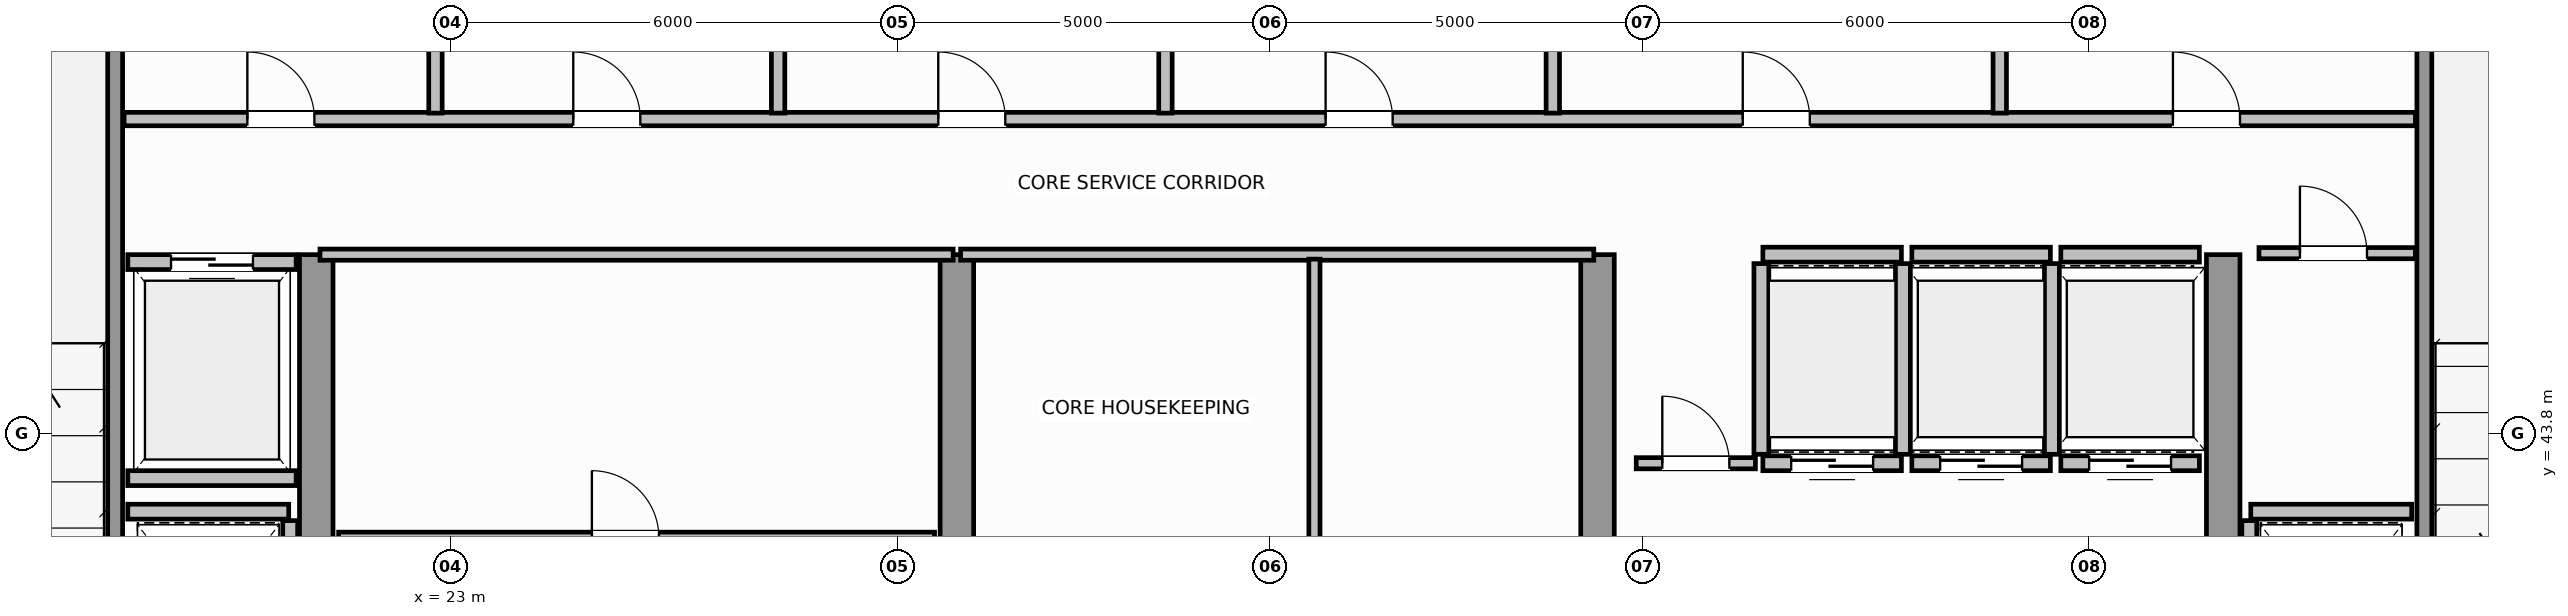
"""IFC4 building model, lengths in metres.
Left out: names, types, materials, properties, quantities, classifications, styles, units other than length and angle.
Written with IfcOpenShell. Run it as: python <this file> out.ifc"""

import sys

from ifc_helpers import new_model, si_unit, direction, frame, frame_2d, origin, place, context, subcontext, project, spatial, rectangle, extrude, source, transform, mapped, element, fill, save


model = new_model("IFC4")
c1 = context("Model", 3, precision=1e-05, world=origin(), true_north=direction((0.0, 1.0)))
c2 = subcontext(c1, "Body", "Model", "MODEL_VIEW")
j1 = project(units=[si_unit("LENGTHUNIT", "METRE"), si_unit("PLANEANGLEUNIT", "RADIAN")], contexts=[c1])
p1 = place(None, origin())
s1 = spatial("IfcSite", under=j1, at=p1, CompositionType="ELEMENT")
p2 = place(p1, origin())
s2 = spatial("IfcBuilding", under=s1, at=p2, CompositionType="ELEMENT")
p3 = place(p2, frame((0.0, 0.0, 249.8)))
s3 = spatial("IfcBuildingStorey", under=s2, at=p3, CompositionType="ELEMENT", Elevation=249.8)
for number, where, z_axis, x_axis in (
    (1, (21.2, 36.745, 0.0), (0.0, 0.0, 1.0), (0.0, 1.0, 0.0)),
    (2, (29.8, 36.745, 0.0), (0.0, 0.0, 1.0), (0.0, 1.0, 0.0)),
    (3, (38.4, 36.745, 0.0), (0.0, 0.0, 1.0), (0.0, 1.0, 0.0)),
    (4, (46.8, 36.745, 0.0), (0.0, 0.0, 1.0), (0.0, 1.0, 0.0)),
):
    element("IfcWall", number, at=place(p3, frame(where, z_axis=z_axis, x_axis=x_axis)), inside=s3, PredefinedType="SHEAR", context=c2, shape_type="SweptSolid", body=[
        extrude(rectangle(XDim=9.455, YDim=0.45, at=frame_2d((4.728, 0.0))), origin(), (0.0, 0.0, 1.0), 3.8),
    ])
for number, where, z_axis, x_axis in (
    (5, (18.5, 39.96, 0.0), (0.0, 0.0, 1.0), (0.0, 1.0, 0.0)),
    (6, (49.5, 39.96, 0.0), (0.0, 0.0, 1.0), (0.0, 1.0, 0.0)),
):
    element("IfcWall", number, at=place(p3, frame(where, z_axis=z_axis, x_axis=x_axis)), inside=s3, PredefinedType="SOLIDWALL", context=c2, shape_type="SweptSolid", body=[
        extrude(rectangle(XDim=9.93, YDim=0.2, at=frame_2d((4.965, 0.0))), origin(), (0.0, 0.0, 1.0), 3.8),
    ])
p4 = place(p3, frame((40.62, 43.4, 0.0), z_axis=(0.0, 0.0, 1.0), x_axis=(1.0, 0.0, 0.0)))
e7 = element("IfcWall", 7, at=p4, inside=s3, PredefinedType="SOLIDWALL", context=c2, shape_type="SweptSolid", body=[
    extrude(rectangle(XDim=1.86, YDim=0.2, at=frame_2d((0.93, 0.0))), origin(), (0.0, 0.0, 1.0), 3.58),
])
p5 = place(p4, frame((0.38, 0.0, 0.0)))
e8 = element("IfcOpeningElement", 8, at=p5, cuts=e7, PredefinedType="OPENING", context=c2, shape_type="SweptSolid", body=[
    extrude(rectangle(XDim=1.1, YDim=2.15, at=frame_2d((0.55, 1.075))), frame((0.0, 0.11, 0.0), z_axis=(0.0, -1.0, 0.0), x_axis=(1.0, 0.0, 0.0)), (0.0, 0.0, 1.0), 0.22),
])
p6 = place(p3, frame((40.62, 46.2, 0.0), z_axis=(0.0, 0.0, 1.0), x_axis=(1.0, 0.0, 0.0)))
e9 = element("IfcWall", 9, at=p6, inside=s3, PredefinedType="SOLIDWALL", context=c2, shape_type="SweptSolid", body=[
    extrude(rectangle(XDim=1.86, YDim=0.2, at=frame_2d((0.93, 0.0))), origin(), (0.0, 0.0, 1.0), 3.58),
])
for number, where, z_axis, x_axis in (
    (10, (40.6, 43.52, 0.0), (0.0, 0.0, 1.0), (0.0, 1.0, 0.0)),
    (11, (42.5, 43.52, 0.0), (0.0, 0.0, 1.0), (0.0, 1.0, 0.0)),
):
    element("IfcWall", number, at=place(p3, frame(where, z_axis=z_axis, x_axis=x_axis)), inside=s3, PredefinedType="SOLIDWALL", context=c2, shape_type="SweptSolid", body=[
        extrude(rectangle(XDim=2.56, YDim=0.2, at=frame_2d((1.28, 0.0))), origin(), (0.0, 0.0, 1.0), 3.58),
    ])
p7 = place(p3, frame((42.62, 43.4, 0.0), z_axis=(0.0, 0.0, 1.0), x_axis=(1.0, 0.0, 0.0)))
e12 = element("IfcWall", 12, at=p7, inside=s3, PredefinedType="SOLIDWALL", context=c2, shape_type="SweptSolid", body=[
    extrude(rectangle(XDim=1.86, YDim=0.2, at=frame_2d((0.93, 0.0))), origin(), (0.0, 0.0, 1.0), 3.58),
])
p8 = place(p7, frame((0.38, 0.0, 0.0)))
e13 = element("IfcOpeningElement", 13, at=p8, cuts=e12, PredefinedType="OPENING", context=c2, shape_type="SweptSolid", body=[
    extrude(rectangle(XDim=1.1, YDim=2.15, at=frame_2d((0.55, 1.075))), frame((0.0, 0.11, 0.0), z_axis=(0.0, -1.0, 0.0), x_axis=(1.0, 0.0, 0.0)), (0.0, 0.0, 1.0), 0.22),
])
p9 = place(p3, frame((42.62, 46.2, 0.0), z_axis=(0.0, 0.0, 1.0), x_axis=(1.0, 0.0, 0.0)))
e14 = element("IfcWall", 14, at=p9, inside=s3, PredefinedType="SOLIDWALL", context=c2, shape_type="SweptSolid", body=[
    extrude(rectangle(XDim=1.86, YDim=0.2, at=frame_2d((0.93, 0.0))), origin(), (0.0, 0.0, 1.0), 3.58),
])
p10 = place(p3, frame((44.5, 43.52, 0.0), z_axis=(0.0, 0.0, 1.0), x_axis=(0.0, 1.0, 0.0)))
e15 = element("IfcWall", 15, at=p10, inside=s3, PredefinedType="SOLIDWALL", context=c2, shape_type="SweptSolid", body=[
    extrude(rectangle(XDim=2.56, YDim=0.2, at=frame_2d((1.28, 0.0))), origin(), (0.0, 0.0, 1.0), 3.58),
])
p11 = place(p3, frame((44.62, 43.4, 0.0), z_axis=(0.0, 0.0, 1.0), x_axis=(1.0, 0.0, 0.0)))
e16 = element("IfcWall", 16, at=p11, inside=s3, PredefinedType="SOLIDWALL", context=c2, shape_type="SweptSolid", body=[
    extrude(rectangle(XDim=1.86, YDim=0.2, at=frame_2d((0.93, 0.0))), origin(), (0.0, 0.0, 1.0), 3.58),
])
p12 = place(p11, frame((0.38, 0.0, 0.0)))
e17 = element("IfcOpeningElement", 17, at=p12, cuts=e16, PredefinedType="OPENING", context=c2, shape_type="SweptSolid", body=[
    extrude(rectangle(XDim=1.1, YDim=2.15, at=frame_2d((0.55, 1.075))), frame((0.0, 0.11, 0.0), z_axis=(0.0, -1.0, 0.0), x_axis=(1.0, 0.0, 0.0)), (0.0, 0.0, 1.0), 0.22),
])
p13 = place(p3, frame((44.62, 46.2, 0.0), z_axis=(0.0, 0.0, 1.0), x_axis=(1.0, 0.0, 0.0)))
e18 = element("IfcWall", 18, at=p13, inside=s3, PredefinedType="SOLIDWALL", context=c2, shape_type="SweptSolid", body=[
    extrude(rectangle(XDim=1.86, YDim=0.2, at=frame_2d((0.93, 0.0))), origin(), (0.0, 0.0, 1.0), 3.58),
])
p14 = place(p3, frame((18.67, 46.1, 0.0), z_axis=(0.0, 0.0, 1.0), x_axis=(1.0, 0.0, 0.0)))
e19 = element("IfcWall", 19, at=p14, inside=s3, PredefinedType="SOLIDWALL", context=c2, shape_type="SweptSolid", body=[
    extrude(rectangle(XDim=2.26, YDim=0.2, at=frame_2d((1.13, 0.0))), origin(), (0.0, 0.0, 1.0), 3.58),
])
p15 = place(p14, frame((0.58, 0.0, 0.0)))
e20 = element("IfcOpeningElement", 20, at=p15, cuts=e19, PredefinedType="OPENING", context=c2, shape_type="SweptSolid", body=[
    extrude(rectangle(XDim=1.1, YDim=2.15, at=frame_2d((0.55, 1.075))), frame((0.0, 0.11, 0.0), z_axis=(0.0, -1.0, 0.0), x_axis=(1.0, 0.0, 0.0)), (0.0, 0.0, 1.0), 0.22),
])
p16 = place(p3, frame((18.67, 43.2, 0.0), z_axis=(0.0, 0.0, 1.0), x_axis=(1.0, 0.0, 0.0)))
e21 = element("IfcWall", 21, at=p16, inside=s3, PredefinedType="SOLIDWALL", context=c2, shape_type="SweptSolid", body=[
    extrude(rectangle(XDim=2.26, YDim=0.2, at=frame_2d((1.13, 0.0))), origin(), (0.0, 0.0, 1.0), 3.58),
])
p17 = place(p3, frame((18.67, 42.75, 0.0), z_axis=(0.0, 0.0, 1.0), x_axis=(1.0, 0.0, 0.0)))
e22 = element("IfcWall", 22, at=p17, inside=s3, PredefinedType="SOLIDWALL", context=c2, shape_type="SweptSolid", body=[
    extrude(rectangle(XDim=2.16, YDim=0.2, at=frame_2d((1.08, 0.0))), origin(), (0.0, 0.0, 1.0), 3.58),
])
p18 = place(p3, frame((20.85, 40.07, 0.0), z_axis=(0.0, 0.0, 1.0), x_axis=(0.0, 1.0, 0.0)))
e23 = element("IfcWall", 23, at=p18, inside=s3, PredefinedType="SOLIDWALL", context=c2, shape_type="SweptSolid", body=[
    extrude(rectangle(XDim=2.56, YDim=0.2, at=frame_2d((1.28, 0.0))), origin(), (0.0, 0.0, 1.0), 3.58),
])
p19 = place(p3, frame((47.17, 42.75, 0.0), z_axis=(0.0, 0.0, 1.0), x_axis=(1.0, 0.0, 0.0)))
e24 = element("IfcWall", 24, at=p19, inside=s3, PredefinedType="SOLIDWALL", context=c2, shape_type="SweptSolid", body=[
    extrude(rectangle(XDim=2.16, YDim=0.2, at=frame_2d((1.08, 0.0))), origin(), (0.0, 0.0, 1.0), 3.58),
])
p20 = place(p3, frame((47.15, 40.07, 0.0), z_axis=(0.0, 0.0, 1.0), x_axis=(0.0, 1.0, 0.0)))
e25 = element("IfcWall", 25, at=p20, inside=s3, PredefinedType="SOLIDWALL", context=c2, shape_type="SweptSolid", body=[
    extrude(rectangle(XDim=2.56, YDim=0.2, at=frame_2d((1.28, 0.0))), origin(), (0.0, 0.0, 1.0), 3.58),
])
p21 = place(p3, frame((21.25, 46.2, 0.0), z_axis=(0.0, 0.0, 1.0), x_axis=(1.0, 0.0, 0.0)))
e26 = element("IfcWall", 26, at=p21, inside=s3, PredefinedType="PARTITIONING", context=c2, shape_type="SweptSolid", body=[
    extrude(rectangle(XDim=8.5, YDim=0.15, at=frame_2d((4.25, 0.0))), origin(), (0.0, 0.0, 1.0), 3.58),
])
p22 = place(p3, frame((21.5, 42.4, 0.0), z_axis=(0.0, 0.0, 1.0), x_axis=(1.0, 0.0, 0.0)))
e27 = element("IfcWall", 27, at=p22, inside=s3, PredefinedType="PARTITIONING", context=c2, shape_type="SweptSolid", body=[
    extrude(rectangle(XDim=8.0, YDim=0.15, at=frame_2d((4.0, 0.0))), origin(), (0.0, 0.0, 1.0), 3.58),
])
p23 = place(p22, frame((3.4, 0.0, 0.0)))
e28 = element("IfcOpeningElement", 28, at=p23, cuts=e27, PredefinedType="OPENING", context=c2, shape_type="SweptSolid", body=[
    extrude(rectangle(XDim=0.9, YDim=2.1, at=frame_2d((0.45, 1.05))), frame((0.0, 0.085, 0.0), z_axis=(0.0, -1.0, 0.0), x_axis=(1.0, 0.0, 0.0)), (0.0, 0.0, 1.0), 0.17),
])
p24 = place(p3, frame((29.85, 46.2, 0.0), z_axis=(0.0, 0.0, 1.0), x_axis=(1.0, 0.0, 0.0)))
e29 = element("IfcWall", 29, at=p24, inside=s3, PredefinedType="PARTITIONING", context=c2, shape_type="SweptSolid", body=[
    extrude(rectangle(XDim=8.5, YDim=0.15, at=frame_2d((4.25, 0.0))), origin(), (0.0, 0.0, 1.0), 3.58),
])
p25 = place(p3, frame((34.6, 36.56, 0.0), z_axis=(0.0, 0.0, 1.0), x_axis=(0.0, 1.0, 0.0)))
e30 = element("IfcWall", 30, at=p25, inside=s3, PredefinedType="PARTITIONING", context=c2, shape_type="SweptSolid", body=[
    extrude(rectangle(XDim=9.58, YDim=0.15, at=frame_2d((4.79, 0.0))), origin(), (0.0, 0.0, 1.0), 3.58),
])
p26 = place(p25, frame((4.2, 0.0, 0.0)))
e31 = element("IfcOpeningElement", 31, at=p26, cuts=e30, PredefinedType="OPENING", context=c2, shape_type="SweptSolid", body=[
    extrude(rectangle(XDim=0.9, YDim=2.1, at=frame_2d((0.45, 1.05))), frame((0.0, 0.085, 0.0), z_axis=(0.0, -1.0, 0.0), x_axis=(1.0, 0.0, 0.0)), (0.0, 0.0, 1.0), 0.17),
])
p27 = place(p3, frame((47.28, 46.22, 0.0), z_axis=(0.0, 0.0, 1.0), x_axis=(1.0, 0.0, 0.0)))
e32 = element("IfcWall", 32, at=p27, inside=s3, PredefinedType="PARTITIONING", context=c2, shape_type="SweptSolid", body=[
    extrude(rectangle(XDim=2.1, YDim=0.15, at=frame_2d((1.05, 0.0))), origin(), (0.0, 0.0, 1.0), 3.58),
])
p28 = place(p27, frame((0.55, 0.0, 0.0)))
e33 = element("IfcOpeningElement", 33, at=p28, cuts=e32, PredefinedType="OPENING", context=c2, shape_type="SweptSolid", body=[
    extrude(rectangle(XDim=0.9, YDim=2.1, at=frame_2d((0.45, 1.05))), frame((0.0, 0.085, 0.0), z_axis=(0.0, -1.0, 0.0), x_axis=(1.0, 0.0, 0.0)), (0.0, 0.0, 1.0), 0.17),
])
p29 = place(p3, frame((38.92, 43.4, 0.0), z_axis=(0.0, 0.0, 1.0), x_axis=(1.0, 0.0, 0.0)))
e34 = element("IfcWall", 34, at=p29, inside=s3, PredefinedType="PARTITIONING", context=c2, shape_type="SweptSolid", body=[
    extrude(rectangle(XDim=1.6, YDim=0.15, at=frame_2d((0.8, 0.0))), origin(), (0.0, 0.0, 1.0), 3.58),
])
p30 = place(p29, frame((0.35, 0.0, 0.0)))
e35 = element("IfcOpeningElement", 35, at=p30, cuts=e34, PredefinedType="OPENING", context=c2, shape_type="SweptSolid", body=[
    extrude(rectangle(XDim=0.9, YDim=2.1, at=frame_2d((0.45, 1.05))), frame((0.0, 0.085, 0.0), z_axis=(0.0, -1.0, 0.0), x_axis=(1.0, 0.0, 0.0)), (0.0, 0.0, 1.0), 0.17),
])
p31 = place(p3, frame((18.62, 48.02, 0.0), z_axis=(0.0, 0.0, 1.0), x_axis=(1.0, 0.0, 0.0)))
e36 = element("IfcWall", 36, at=p31, inside=s3, PredefinedType="PLUMBINGWALL", context=c2, shape_type="SweptSolid", body=[
    extrude(rectangle(XDim=30.76, YDim=0.18, at=frame_2d((15.38, 0.0))), origin(), (0.0, 0.0, 1.0), 3.58),
])
p32 = place(p31, frame((1.655, 0.0, 0.0)))
e37 = element("IfcOpeningElement", 37, at=p32, cuts=e36, PredefinedType="OPENING", context=c2, shape_type="SweptSolid", body=[
    extrude(rectangle(XDim=0.9, YDim=2.15, at=frame_2d((0.45, 1.075))), frame((0.0, 0.1, 0.0), z_axis=(0.0, -1.0, 0.0), x_axis=(1.0, 0.0, 0.0)), (0.0, 0.0, 1.0), 0.2),
])
p33 = place(p31, frame((6.03, 0.0, 0.0)))
e38 = element("IfcOpeningElement", 38, at=p33, cuts=e36, PredefinedType="OPENING", context=c2, shape_type="SweptSolid", body=[
    extrude(rectangle(XDim=0.9, YDim=2.15, at=frame_2d((0.45, 1.075))), frame((0.0, 0.1, 0.0), z_axis=(0.0, -1.0, 0.0), x_axis=(1.0, 0.0, 0.0)), (0.0, 0.0, 1.0), 0.2),
])
p34 = place(p31, frame((10.93, 0.0, 0.0)))
e39 = element("IfcOpeningElement", 39, at=p34, cuts=e36, PredefinedType="OPENING", context=c2, shape_type="SweptSolid", body=[
    extrude(rectangle(XDim=0.9, YDim=2.15, at=frame_2d((0.45, 1.075))), frame((0.0, 0.1, 0.0), z_axis=(0.0, -1.0, 0.0), x_axis=(1.0, 0.0, 0.0)), (0.0, 0.0, 1.0), 0.2),
])
p35 = place(p31, frame((16.13, 0.0, 0.0)))
e40 = element("IfcOpeningElement", 40, at=p35, cuts=e36, PredefinedType="OPENING", context=c2, shape_type="SweptSolid", body=[
    extrude(rectangle(XDim=0.9, YDim=2.15, at=frame_2d((0.45, 1.075))), frame((0.0, 0.1, 0.0), z_axis=(0.0, -1.0, 0.0), x_axis=(1.0, 0.0, 0.0)), (0.0, 0.0, 1.0), 0.2),
])
p36 = place(p31, frame((21.73, 0.0, 0.0)))
e41 = element("IfcOpeningElement", 41, at=p36, cuts=e36, PredefinedType="OPENING", context=c2, shape_type="SweptSolid", body=[
    extrude(rectangle(XDim=0.9, YDim=2.15, at=frame_2d((0.45, 1.075))), frame((0.0, 0.1, 0.0), z_axis=(0.0, -1.0, 0.0), x_axis=(1.0, 0.0, 0.0)), (0.0, 0.0, 1.0), 0.2),
])
p37 = place(p31, frame((27.505, 0.0, 0.0)))
e42 = element("IfcOpeningElement", 42, at=p37, cuts=e36, PredefinedType="OPENING", context=c2, shape_type="SweptSolid", body=[
    extrude(rectangle(XDim=0.9, YDim=2.15, at=frame_2d((0.45, 1.075))), frame((0.0, 0.1, 0.0), z_axis=(0.0, -1.0, 0.0), x_axis=(1.0, 0.0, 0.0)), (0.0, 0.0, 1.0), 0.2),
])
p38 = place(p3, frame((22.8, 48.1, 0.0), z_axis=(0.0, 0.0, 1.0), x_axis=(0.0, 1.0, 0.0)))
e43 = element("IfcWall", 43, at=p38, inside=s3, PredefinedType="PLUMBINGWALL", context=c2, shape_type="SweptSolid", body=[
    extrude(rectangle(XDim=2.43, YDim=0.18, at=frame_2d((1.215, 0.0))), origin(), (0.0, 0.0, 1.0), 3.02),
])
for number, where, z_axis, x_axis in (
    (44, (27.4, 48.1, 0.0), (0.0, 0.0, 1.0), (0.0, 1.0, 0.0)),
    (45, (32.6, 48.1, 0.0), (0.0, 0.0, 1.0), (0.0, 1.0, 0.0)),
    (46, (37.8, 48.1, 0.0), (0.0, 0.0, 1.0), (0.0, 1.0, 0.0)),
    (47, (43.8, 48.1, 0.0), (0.0, 0.0, 1.0), (0.0, 1.0, 0.0)),
):
    element("IfcWall", number, at=place(p3, frame(where, z_axis=z_axis, x_axis=x_axis)), inside=s3, PredefinedType="PLUMBINGWALL", context=c2, shape_type="SweptSolid", body=[
        extrude(rectangle(XDim=2.43, YDim=0.18, at=frame_2d((1.215, 0.0))), origin(), (0.0, 0.0, 1.0), 3.58),
    ])
m1 = source(origin(), c2, "Body", "SweptSolid", [
    extrude(rectangle(XDim=1.1, YDim=2.15, at=frame_2d((0.55, 1.075))), frame((0.0, 0.025, 0.0), z_axis=(0.0, -1.0, 0.0), x_axis=(1.0, 0.0, 0.0)), (0.0, 0.0, 1.0), 0.05),
])
p39 = place(p5, origin())
e48 = element("IfcDoor", 48, at=p39, inside=s3, OperationType="DOUBLE_DOOR_SLIDING", PredefinedType="DOOR", context=c2, shape_type="MappedRepresentation", body=[
    mapped(m1, transform((0.0, 0.0, 0.0), scale=1.0)),
])
fill(e8, e48)
p40 = place(p8, origin())
e49 = element("IfcDoor", 49, at=p40, inside=s3, OperationType="DOUBLE_DOOR_SLIDING", PredefinedType="DOOR", context=c2, shape_type="MappedRepresentation", body=[
    mapped(m1, transform((0.0, 0.0, 0.0), scale=1.0)),
])
fill(e13, e49)
p41 = place(p12, origin())
e50 = element("IfcDoor", 50, at=p41, inside=s3, OperationType="DOUBLE_DOOR_SLIDING", PredefinedType="DOOR", context=c2, shape_type="MappedRepresentation", body=[
    mapped(m1, transform((0.0, 0.0, 0.0), scale=1.0)),
])
fill(e17, e50)
p42 = place(p15, origin())
e51 = element("IfcDoor", 51, at=p42, inside=s3, OperationType="DOUBLE_DOOR_SLIDING", PredefinedType="DOOR", context=c2, shape_type="MappedRepresentation", body=[
    mapped(m1, transform((0.0, 0.0, 0.0), scale=1.0)),
])
fill(e20, e51)
m2 = source(origin(), c2, "Body", "SweptSolid", [
    extrude(rectangle(XDim=0.9, YDim=2.1, at=frame_2d((0.45, 1.05))), frame((0.0, 0.025, 0.0), z_axis=(0.0, -1.0, 0.0), x_axis=(1.0, 0.0, 0.0)), (0.0, 0.0, 1.0), 0.05),
])
p43 = place(p23, origin())
e52 = element("IfcDoor", 52, at=p43, inside=s3, OperationType="SINGLE_SWING_RIGHT", PredefinedType="DOOR", context=c2, shape_type="MappedRepresentation", body=[
    mapped(m2, transform((0.0, 0.0, 0.0), scale=1.0)),
])
fill(e28, e52)
p44 = place(p28, origin())
e53 = element("IfcDoor", 53, at=p44, inside=s3, OperationType="SINGLE_SWING_RIGHT", PredefinedType="DOOR", context=c2, shape_type="MappedRepresentation", body=[
    mapped(m2, transform((0.0, 0.0, 0.0), scale=1.0)),
])
fill(e33, e53)
p45 = place(p30, origin())
e54 = element("IfcDoor", 54, at=p45, inside=s3, OperationType="SINGLE_SWING_LEFT", PredefinedType="DOOR", context=c2, shape_type="MappedRepresentation", body=[
    mapped(m2, transform((0.0, 0.0, 0.0), scale=1.0)),
])
fill(e35, e54)
m3 = source(origin(), c2, "Body", "SweptSolid", [
    extrude(rectangle(XDim=0.9, YDim=2.15, at=frame_2d((0.45, 1.075))), frame((0.0, 0.025, 0.0), z_axis=(0.0, -1.0, 0.0), x_axis=(1.0, 0.0, 0.0)), (0.0, 0.0, 1.0), 0.05),
])
p46 = place(p32, origin())
e55 = element("IfcDoor", 55, at=p46, inside=s3, OperationType="SINGLE_SWING_LEFT", PredefinedType="DOOR", context=c2, shape_type="MappedRepresentation", body=[
    mapped(m3, transform((0.0, 0.0, 0.0), scale=1.0)),
])
fill(e37, e55)
p47 = place(p33, origin())
e56 = element("IfcDoor", 56, at=p47, inside=s3, OperationType="SINGLE_SWING_RIGHT", PredefinedType="DOOR", context=c2, shape_type="MappedRepresentation", body=[
    mapped(m3, transform((0.0, 0.0, 0.0), scale=1.0)),
])
fill(e38, e56)
p48 = place(p34, origin())
e57 = element("IfcDoor", 57, at=p48, inside=s3, OperationType="SINGLE_SWING_LEFT", PredefinedType="DOOR", context=c2, shape_type="MappedRepresentation", body=[
    mapped(m3, transform((0.0, 0.0, 0.0), scale=1.0)),
])
fill(e39, e57)
p49 = place(p35, origin())
e58 = element("IfcDoor", 58, at=p49, inside=s3, OperationType="SINGLE_SWING_RIGHT", PredefinedType="DOOR", context=c2, shape_type="MappedRepresentation", body=[
    mapped(m3, transform((0.0, 0.0, 0.0), scale=1.0)),
])
fill(e40, e58)
p50 = place(p36, origin())
e59 = element("IfcDoor", 59, at=p50, inside=s3, OperationType="SINGLE_SWING_LEFT", PredefinedType="DOOR", context=c2, shape_type="MappedRepresentation", body=[
    mapped(m3, transform((0.0, 0.0, 0.0), scale=1.0)),
])
fill(e41, e59)
p51 = place(p37, origin())
e60 = element("IfcDoor", 60, at=p51, inside=s3, OperationType="SINGLE_SWING_RIGHT", PredefinedType="DOOR", context=c2, shape_type="MappedRepresentation", body=[
    mapped(m3, transform((0.0, 0.0, 0.0), scale=1.0)),
])
fill(e42, e60)
save(model, sys.argv[1])
